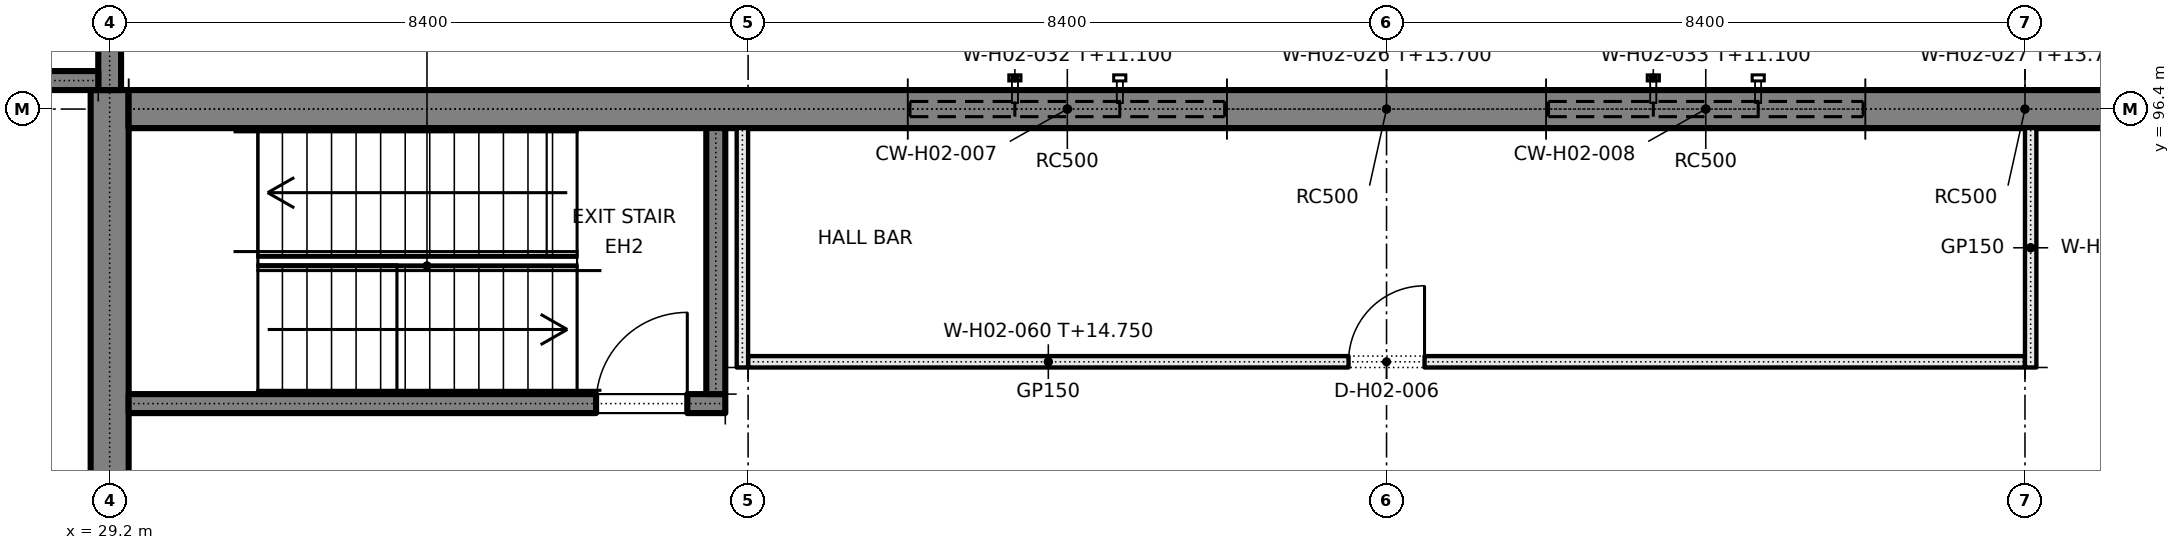
"""IFC4 building model, lengths in metres.
Left out: names, types, materials, properties, quantities, classifications, styles, units other than length and angle.
Written with IfcOpenShell. Run it as: python <this file> out.ifc"""

import sys

from ifc_helpers import new_model, si_unit, direction, frame, frame_2d, origin, place, context, subcontext, project, spatial, rectangle, extrude, element, fill, save


model = new_model("IFC4")
c1 = context("Model", 3, precision=1e-05, world=origin(), true_north=direction((0.0, 1.0)))
c2 = subcontext(c1, "Body", "Model", "MODEL_VIEW")
j1 = project(units=[si_unit("LENGTHUNIT", "METRE"), si_unit("PLANEANGLEUNIT", "RADIAN")], contexts=[c1])
p1 = place(None, origin())
s1 = spatial("IfcSite", under=j1, at=p1, CompositionType="ELEMENT")
p2 = place(p1, origin())
s2 = spatial("IfcBuilding", under=s1, at=p2, CompositionType="ELEMENT")
p3 = place(p2, frame((0.0, 0.0, 10.2)))
s3 = spatial("IfcBuildingStorey", under=s2, at=p3, CompositionType="ELEMENT", Elevation=10.2)
p4 = place(p3, frame((29.2, 54.15, 0.0), z_axis=(0.0, 0.0, 1.0), x_axis=(0.0, 1.0, 0.0)))
e1 = element("IfcWall", 1, at=p4, inside=s3, PredefinedType="SOLIDWALL", context=c2, shape_type="SweptSolid", body=[
    extrude(rectangle(XDim=42.5, YDim=0.5, at=frame_2d((21.25, 0.0))), origin(), (0.0, 0.0, 1.0), 4.8),
])
p5 = place(p4, frame((7.75, 0.0, 0.0)))
e2 = element("IfcOpeningElement", 2, at=p5, cuts=e1, PredefinedType="OPENING", context=c2, shape_type="SweptSolid", body=[
    extrude(rectangle(XDim=1.8, YDim=2.1, at=frame_2d((0.9, 1.05))), frame((0.0, 0.26, 0.0), z_axis=(0.0, -1.0, 0.0), x_axis=(1.0, 0.0, 0.0)), (0.0, 0.0, 1.0), 0.52),
])
p6 = place(p4, frame((20.35, 0.0, 0.0)))
e3 = element("IfcOpeningElement", 3, at=p6, cuts=e1, PredefinedType="OPENING", context=c2, shape_type="SweptSolid", body=[
    extrude(rectangle(XDim=1.8, YDim=2.1, at=frame_2d((0.9, 1.05))), frame((0.0, 0.26, 0.0), z_axis=(0.0, -1.0, 0.0), x_axis=(1.0, 0.0, 0.0)), (0.0, 0.0, 1.0), 0.52),
])
p7 = place(p4, frame((32.95, 0.0, 0.0)))
e4 = element("IfcOpeningElement", 4, at=p7, cuts=e1, PredefinedType="OPENING", context=c2, shape_type="SweptSolid", body=[
    extrude(rectangle(XDim=1.8, YDim=2.1, at=frame_2d((0.9, 1.05))), frame((0.0, 0.26, 0.0), z_axis=(0.0, -1.0, 0.0), x_axis=(1.0, 0.0, 0.0)), (0.0, 0.0, 1.0), 0.52),
])
p8 = place(p3, frame((29.45, 96.4, 0.0), z_axis=(0.0, 0.0, 1.0), x_axis=(1.0, 0.0, 0.0)))
e5 = element("IfcWall", 5, at=p8, inside=s3, PredefinedType="SOLIDWALL", context=c2, shape_type="SweptSolid", body=[
    extrude(rectangle(XDim=10.25, YDim=0.5, at=frame_2d((5.125, 0.0))), origin(), (0.0, 0.0, 1.0), 3.5),
])
p9 = place(p3, frame((43.9, 96.4, 0.0), z_axis=(0.0, 0.0, 1.0), x_axis=(1.0, 0.0, 0.0)))
e6 = element("IfcWall", 6, at=p9, inside=s3, PredefinedType="SOLIDWALL", context=c2, shape_type="SweptSolid", body=[
    extrude(rectangle(XDim=4.2, YDim=0.5, at=frame_2d((2.1, 0.0))), origin(), (0.0, 0.0, 1.0), 3.5),
])
p10 = place(p3, frame((52.3, 96.4, 0.0), z_axis=(0.0, 0.0, 1.0), x_axis=(1.0, 0.0, 0.0)))
e7 = element("IfcWall", 7, at=p10, inside=s3, PredefinedType="SOLIDWALL", context=c2, shape_type="SweptSolid", body=[
    extrude(rectangle(XDim=4.2, YDim=0.5, at=frame_2d((2.1, 0.0))), origin(), (0.0, 0.0, 1.0), 3.5),
])
for number, where, z_axis, x_axis in (
    (8, (39.7, 96.4, 0.0), (0.0, 0.0, 1.0), (1.0, 0.0, 0.0)),
    (9, (48.1, 96.4, 0.0), (0.0, 0.0, 1.0), (1.0, 0.0, 0.0)),
):
    element("IfcWall", number, at=place(p3, frame(where, z_axis=z_axis, x_axis=x_axis)), inside=s3, PredefinedType="SOLIDWALL", context=c2, shape_type="SweptSolid", body=[
        extrude(rectangle(XDim=4.2, YDim=0.5, at=frame_2d((2.1, 0.0))), origin(), (0.0, 0.0, 1.0), 0.9),
    ])
p11 = place(p3, frame((29.45, 96.4, 3.5), z_axis=(0.0, 0.0, 1.0), x_axis=(1.0, 0.0, 0.0)))
e10 = element("IfcWall", 10, at=p11, inside=s3, PredefinedType="SOLIDWALL", context=c2, shape_type="SweptSolid", body=[
    extrude(rectangle(XDim=66.7, YDim=0.5, at=frame_2d((33.35, 0.0))), origin(), (0.0, 0.0, 1.0), 1.3),
])
p12 = place(p3, frame((29.45, 92.525, 0.0), z_axis=(0.0, 0.0, 1.0), x_axis=(1.0, 0.0, 0.0)))
e11 = element("IfcWall", 11, at=p12, inside=s3, PredefinedType="SOLIDWALL", context=c2, shape_type="SweptSolid", body=[
    extrude(rectangle(XDim=7.85, YDim=0.25, at=frame_2d((3.925, 0.0))), origin(), (0.0, 0.0, 1.0), 4.8),
])
p13 = place(p12, frame((6.15, 0.0, 0.0)))
e12 = element("IfcOpeningElement", 12, at=p13, cuts=e11, PredefinedType="OPENING", context=c2, shape_type="SweptSolid", body=[
    extrude(rectangle(XDim=1.2, YDim=2.1, at=frame_2d((0.6, 1.05))), frame((0.0, 0.135, 0.0), z_axis=(0.0, -1.0, 0.0), x_axis=(1.0, 0.0, 0.0)), (0.0, 0.0, 1.0), 0.27),
])
p14 = place(p3, frame((37.175, 92.65, 0.0), z_axis=(0.0, 0.0, 1.0), x_axis=(0.0, 1.0, 0.0)))
e13 = element("IfcWall", 13, at=p14, inside=s3, PredefinedType="SOLIDWALL", context=c2, shape_type="SweptSolid", body=[
    extrude(rectangle(XDim=3.5, YDim=0.25, at=frame_2d((1.75, 0.0))), origin(), (0.0, 0.0, 1.0), 4.8),
])
p15 = place(p3, frame((29.2, 96.65, 0.0), z_axis=(0.0, 0.0, 1.0), x_axis=(0.0, 1.0, 0.0)))
e14 = element("IfcWall", 14, at=p15, inside=s3, PredefinedType="SOLIDWALL", context=c2, shape_type="SweptSolid", body=[
    extrude(rectangle(XDim=7.972, YDim=0.3, at=frame_2d((3.986, 0.0))), origin(), (0.0, 0.0, 1.0), 4.8),
])
p16 = place(p3, frame((37.6, 93.075, 0.0), z_axis=(0.0, 0.0, 1.0), x_axis=(1.0, 0.0, 0.0)))
e15 = element("IfcWall", 15, at=p16, inside=s3, PredefinedType="PARTITIONING", context=c2, shape_type="SweptSolid", body=[
    extrude(rectangle(XDim=16.8, YDim=0.15, at=frame_2d((8.4, 0.0))), origin(), (0.0, 0.0, 1.0), 4.55),
])
p17 = place(p16, frame((7.9, 0.0, 0.0)))
e16 = element("IfcOpeningElement", 16, at=p17, cuts=e15, PredefinedType="OPENING", context=c2, shape_type="SweptSolid", body=[
    extrude(rectangle(XDim=1.0, YDim=2.1, at=frame_2d((0.5, 1.05))), frame((0.0, 0.085, 0.0), z_axis=(0.0, -1.0, 0.0), x_axis=(1.0, 0.0, 0.0)), (0.0, 0.0, 1.0), 0.17),
])
p18 = place(p3, frame((37.525, 93.0, 0.0), z_axis=(0.0, 0.0, 1.0), x_axis=(0.0, 1.0, 0.0)))
e17 = element("IfcWall", 17, at=p18, inside=s3, PredefinedType="PARTITIONING", context=c2, shape_type="SweptSolid", body=[
    extrude(rectangle(XDim=3.15, YDim=0.15, at=frame_2d((1.575, 0.0))), origin(), (0.0, 0.0, 1.0), 3.95),
])
p19 = place(p3, frame((54.475, 93.0, 0.0), z_axis=(0.0, 0.0, 1.0), x_axis=(0.0, 1.0, 0.0)))
e18 = element("IfcWall", 18, at=p19, inside=s3, PredefinedType="PARTITIONING", context=c2, shape_type="SweptSolid", body=[
    extrude(rectangle(XDim=3.15, YDim=0.15, at=frame_2d((1.575, 0.0))), origin(), (0.0, 0.0, 1.0), 4.55),
])
p20 = place(p3, frame((25.8, 96.775, 0.0), z_axis=(0.0, 0.0, 1.0), x_axis=(1.0, 0.0, 0.0)))
e19 = element("IfcWall", 19, at=p20, inside=s3, PredefinedType="SHEAR", context=c2, shape_type="SweptSolid", body=[
    extrude(rectangle(XDim=3.25, YDim=0.25, at=frame_2d((1.625, 0.0))), origin(), (0.0, 0.0, 1.0), 4.8),
])
p21 = place(p17, origin())
e20 = element("IfcDoor", 20, at=p21, inside=s3, OperationType="SINGLE_SWING_RIGHT", PredefinedType="DOOR", context=c2, shape_type="SweptSolid", body=[
    extrude(rectangle(XDim=1.0, YDim=2.1, at=frame_2d((0.5, 1.05))), frame((0.0, 0.025, 0.0), z_axis=(0.0, -1.0, 0.0), x_axis=(1.0, 0.0, 0.0)), (0.0, 0.0, 1.0), 0.05),
])
fill(e16, e20)
p22 = place(p13, origin())
e21 = element("IfcDoor", 21, at=p22, inside=s3, OperationType="SINGLE_SWING_RIGHT", PredefinedType="DOOR", context=c2, shape_type="SweptSolid", body=[
    extrude(rectangle(XDim=1.2, YDim=2.1, at=frame_2d((0.6, 1.05))), frame((0.0, 0.025, 0.0), z_axis=(0.0, -1.0, 0.0), x_axis=(1.0, 0.0, 0.0)), (0.0, 0.0, 1.0), 0.05),
])
fill(e12, e21)
save(model, sys.argv[1])
